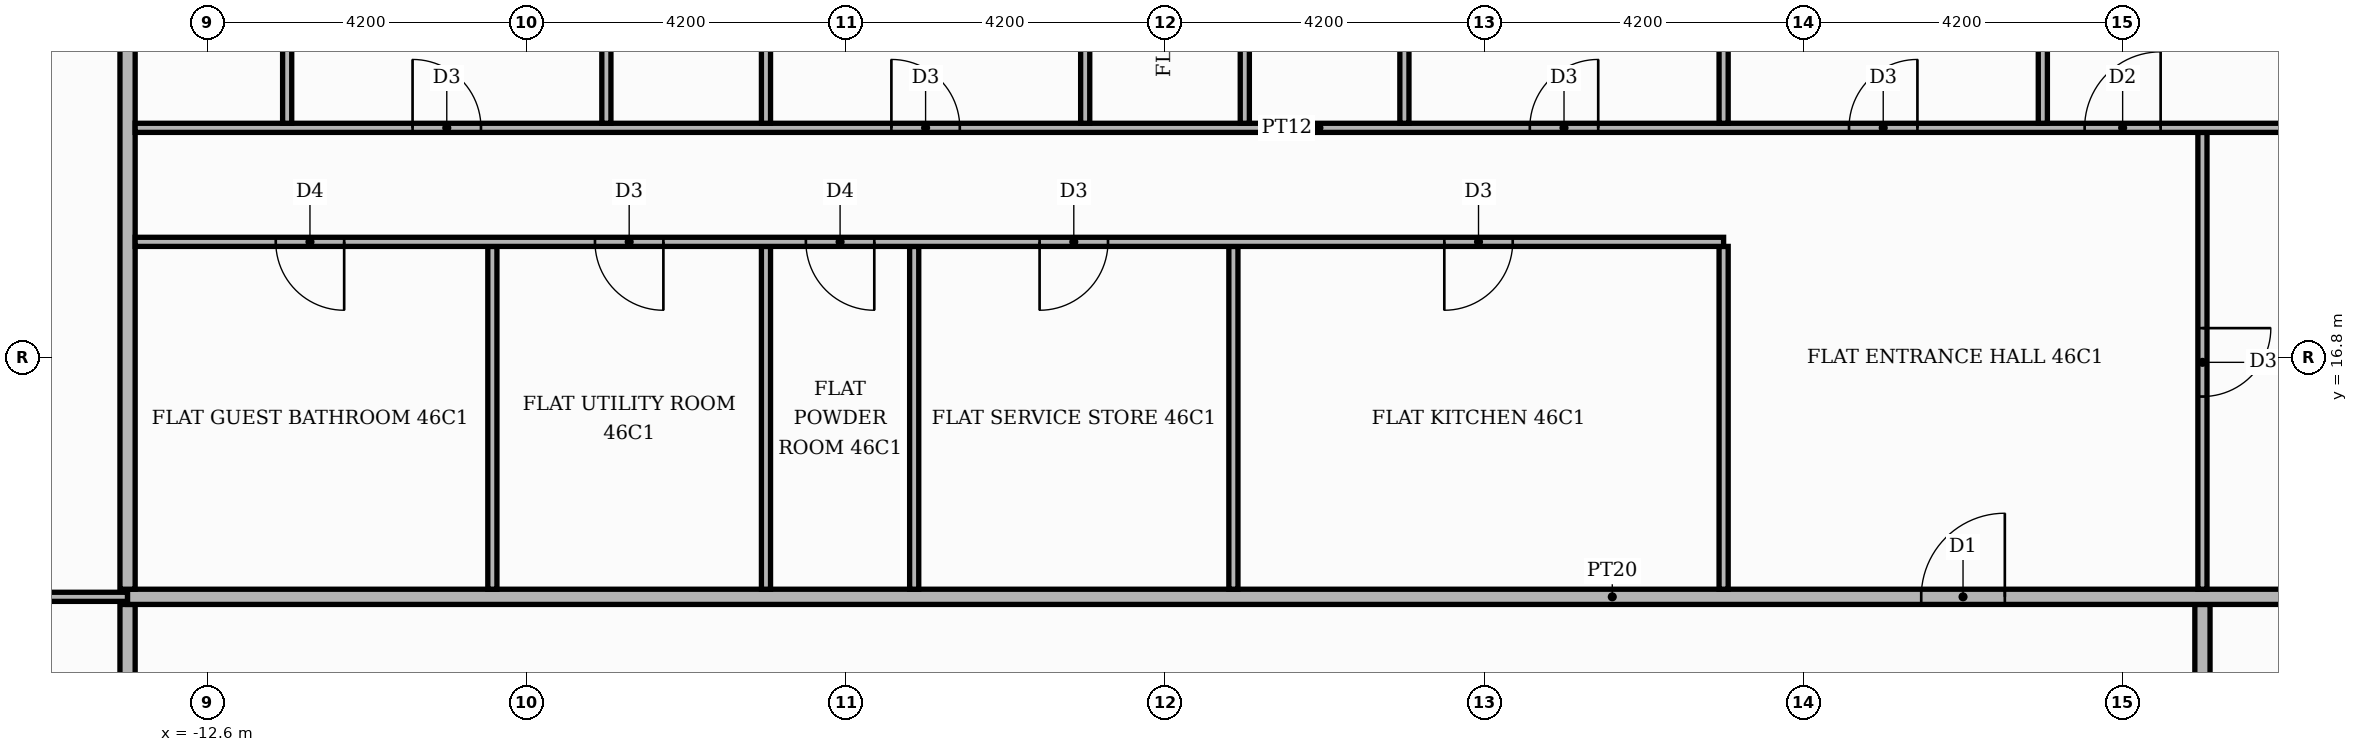
"""IFC4 building model, lengths in metres.
Left out: names, types, materials, properties, quantities, classifications, styles, units other than length and angle.
Written with IfcOpenShell. Run it as: python <this file> out.ifc"""

import sys

from ifc_helpers import new_model, si_unit, direction, frame, frame_2d, origin, place, context, subcontext, project, spatial, rectangle, extrude, element, fill, save


model = new_model("IFC4")
c1 = context("Model", 3, precision=1e-05, world=origin(), true_north=direction((0.0, 1.0)))
c2 = subcontext(c1, "Body", "Model", "MODEL_VIEW")
j1 = project(units=[si_unit("LENGTHUNIT", "METRE"), si_unit("PLANEANGLEUNIT", "RADIAN")], contexts=[c1])
p1 = place(None, origin())
s1 = spatial("IfcSite", under=j1, at=p1, CompositionType="ELEMENT")
p2 = place(p1, origin())
s2 = spatial("IfcBuilding", under=s1, at=p2, CompositionType="ELEMENT")
p3 = place(p2, frame((0.0, 0.0, 196.2)))
s3 = spatial("IfcBuildingStorey", under=s2, at=p3, CompositionType="ELEMENT", Elevation=196.2)
p4 = place(p3, frame((-13.65, -13.55, 0.0), z_axis=(0.0, 0.0, 1.0), x_axis=(0.0, 1.0, 0.0)))
e1 = element("IfcWall", 1, at=p4, inside=s3, PredefinedType="PARTITIONING", context=c2, shape_type="SweptSolid", body=[
    extrude(rectangle(XDim=27.1, YDim=0.2, at=frame_2d((13.55, 0.0))), origin(), (0.0, 0.0, 1.0), 3.48),
])
p5 = place(p4, frame((23.5, 0.0, 0.0)))
e2 = element("IfcOpeningElement", 2, at=p5, cuts=e1, PredefinedType="OPENING", context=c2, shape_type="SweptSolid", body=[
    extrude(rectangle(XDim=1.1, YDim=2.4, at=frame_2d((0.55, 1.2))), frame((0.0, 0.11, 0.0), z_axis=(0.0, -1.0, 0.0), x_axis=(1.0, 0.0, 0.0)), (0.0, 0.0, 1.0), 0.22),
])
p6 = place(p3, frame((13.65, 11.1, 0.0), z_axis=(0.0, 0.0, 1.0), x_axis=(0.0, 1.0, 0.0)))
e3 = element("IfcWall", 3, at=p6, inside=s3, PredefinedType="PARTITIONING", context=c2, shape_type="SweptSolid", body=[
    extrude(rectangle(XDim=2.45, YDim=0.2, at=frame_2d((1.225, 0.0))), origin(), (0.0, 0.0, 1.0), 3.48),
])
p7 = place(p3, frame((-20.12, 13.65, 0.0), z_axis=(0.0, 0.0, 1.0), x_axis=(1.0, 0.0, 0.0)))
e4 = element("IfcWall", 4, at=p7, inside=s3, PredefinedType="PARTITIONING", context=c2, shape_type="SweptSolid", body=[
    extrude(rectangle(XDim=6.47, YDim=0.12, at=frame_2d((3.235, 0.0))), origin(), (0.0, 0.0, 1.0), 3.48),
])
p8 = place(p7, frame((2.785, 0.0, 0.0)))
e5 = element("IfcOpeningElement", 5, at=p8, cuts=e4, PredefinedType="OPENING", context=c2, shape_type="SweptSolid", body=[
    extrude(rectangle(XDim=0.9, YDim=2.1, at=frame_2d((0.45, 1.05))), frame((0.0, 0.07, 0.0), z_axis=(0.0, -1.0, 0.0), x_axis=(1.0, 0.0, 0.0)), (0.0, 0.0, 1.0), 0.14),
])
p9 = place(p3, frame((-13.65, 13.65, 0.0), z_axis=(0.0, 0.0, 1.0), x_axis=(1.0, 0.0, 0.0)))
e6 = element("IfcWall", 6, at=p9, inside=s3, PredefinedType="PARTITIONING", context=c2, shape_type="SweptSolid", body=[
    extrude(rectangle(XDim=39.07, YDim=0.2, at=frame_2d((19.535, 0.0))), origin(), (0.0, 0.0, 1.0), 3.48),
])
p10 = place(p9, frame((23.6, 0.0, 0.0)))
e7 = element("IfcOpeningElement", 7, at=p10, cuts=e6, PredefinedType="OPENING", context=c2, shape_type="SweptSolid", body=[
    extrude(rectangle(XDim=1.1, YDim=2.4, at=frame_2d((0.55, 1.2))), frame((0.0, 0.11, 0.0), z_axis=(0.0, -1.0, 0.0), x_axis=(1.0, 0.0, 0.0)), (0.0, 0.0, 1.0), 0.22),
])
p11 = place(p3, frame((-13.65, 13.75, 0.0), z_axis=(0.0, 0.0, 1.0), x_axis=(0.0, 1.0, 0.0)))
e8 = element("IfcWall", 8, at=p11, inside=s3, PredefinedType="PARTITIONING", context=c2, shape_type="SweptSolid", body=[
    extrude(rectangle(XDim=11.67, YDim=0.2, at=frame_2d((5.835, 0.0))), origin(), (0.0, 0.0, 1.0), 3.48),
])
for number, where, z_axis, x_axis in (
    (9, (-8.85, 13.75, 0.0), (0.0, 0.0, 1.0), (0.0, 1.0, 0.0)),
    (10, (-5.25, 13.75, 0.0), (0.0, 0.0, 1.0), (0.0, 1.0, 0.0)),
    (11, (-3.3, 13.75, 0.0), (0.0, 0.0, 1.0), (0.0, 1.0, 0.0)),
    (12, (0.9, 13.75, 0.0), (0.0, 0.0, 1.0), (0.0, 1.0, 0.0)),
    (13, (7.35, 13.75, 0.0), (0.0, 0.0, 1.0), (0.0, 1.0, 0.0)),
):
    element("IfcWall", number, at=place(p3, frame(where, z_axis=z_axis, x_axis=x_axis)), inside=s3, PredefinedType="PARTITIONING", context=c2, shape_type="SweptSolid", body=[
        extrude(rectangle(XDim=4.51, YDim=0.12, at=frame_2d((2.255, 0.0))), origin(), (0.0, 0.0, 1.0), 3.48),
    ])
p12 = place(p3, frame((13.65, 13.75, 0.0), z_axis=(0.0, 0.0, 1.0), x_axis=(0.0, 1.0, 0.0)))
e14 = element("IfcWall", 14, at=p12, inside=s3, PredefinedType="PARTITIONING", context=c2, shape_type="SweptSolid", body=[
    extrude(rectangle(XDim=6.01, YDim=0.12, at=frame_2d((3.005, 0.0))), origin(), (0.0, 0.0, 1.0), 3.48),
])
p13 = place(p12, frame((2.535, 0.0, 0.0)))
e15 = element("IfcOpeningElement", 15, at=p13, cuts=e14, PredefinedType="OPENING", context=c2, shape_type="SweptSolid", body=[
    extrude(rectangle(XDim=0.9, YDim=2.1, at=frame_2d((0.45, 1.05))), frame((0.0, 0.07, 0.0), z_axis=(0.0, -1.0, 0.0), x_axis=(1.0, 0.0, 0.0)), (0.0, 0.0, 1.0), 0.14),
])
p14 = place(p3, frame((-13.55, 18.32, 0.0), z_axis=(0.0, 0.0, 1.0), x_axis=(1.0, 0.0, 0.0)))
e16 = element("IfcWall", 16, at=p14, inside=s3, PredefinedType="PARTITIONING", context=c2, shape_type="SweptSolid", body=[
    extrude(rectangle(XDim=20.9, YDim=0.12, at=frame_2d((10.45, 0.0))), origin(), (0.0, 0.0, 1.0), 3.48),
])
p15 = place(p14, frame((17.225, 0.0, 0.0)))
e17 = element("IfcOpeningElement", 17, at=p15, cuts=e16, PredefinedType="OPENING", context=c2, shape_type="SweptSolid", body=[
    extrude(rectangle(XDim=0.9, YDim=2.1, at=frame_2d((0.45, 1.05))), frame((0.0, 0.07, 0.0), z_axis=(0.0, -1.0, 0.0), x_axis=(1.0, 0.0, 0.0)), (0.0, 0.0, 1.0), 0.14),
])
p16 = place(p14, frame((11.9, 0.0, 0.0)))
e18 = element("IfcOpeningElement", 18, at=p16, cuts=e16, PredefinedType="OPENING", context=c2, shape_type="SweptSolid", body=[
    extrude(rectangle(XDim=0.9, YDim=2.1, at=frame_2d((0.45, 1.05))), frame((0.0, 0.07, 0.0), z_axis=(0.0, -1.0, 0.0), x_axis=(1.0, 0.0, 0.0)), (0.0, 0.0, 1.0), 0.14),
])
p17 = place(p14, frame((8.825, 0.0, 0.0)))
e19 = element("IfcOpeningElement", 19, at=p17, cuts=e16, PredefinedType="OPENING", context=c2, shape_type="SweptSolid", body=[
    extrude(rectangle(XDim=0.9, YDim=2.1, at=frame_2d((0.45, 1.05))), frame((0.0, 0.07, 0.0), z_axis=(0.0, -1.0, 0.0), x_axis=(1.0, 0.0, 0.0)), (0.0, 0.0, 1.0), 0.14),
])
p18 = place(p14, frame((6.05, 0.0, 0.0)))
e20 = element("IfcOpeningElement", 20, at=p18, cuts=e16, PredefinedType="OPENING", context=c2, shape_type="SweptSolid", body=[
    extrude(rectangle(XDim=0.9, YDim=2.1, at=frame_2d((0.45, 1.05))), frame((0.0, 0.07, 0.0), z_axis=(0.0, -1.0, 0.0), x_axis=(1.0, 0.0, 0.0)), (0.0, 0.0, 1.0), 0.14),
])
p19 = place(p14, frame((1.85, 0.0, 0.0)))
e21 = element("IfcOpeningElement", 21, at=p19, cuts=e16, PredefinedType="OPENING", context=c2, shape_type="SweptSolid", body=[
    extrude(rectangle(XDim=0.9, YDim=2.1, at=frame_2d((0.45, 1.05))), frame((0.0, 0.07, 0.0), z_axis=(0.0, -1.0, 0.0), x_axis=(1.0, 0.0, 0.0)), (0.0, 0.0, 1.0), 0.14),
])
p20 = place(p3, frame((-13.55, 19.82, 0.0), z_axis=(0.0, 0.0, 1.0), x_axis=(1.0, 0.0, 0.0)))
e22 = element("IfcWall", 22, at=p20, inside=s3, PredefinedType="PARTITIONING", context=c2, shape_type="SweptSolid", body=[
    extrude(rectangle(XDim=31.15, YDim=0.12, at=frame_2d((15.575, 0.0))), origin(), (0.0, 0.0, 1.0), 3.48),
])
p21 = place(p20, frame((25.65, 0.0, 0.0)))
e23 = element("IfcOpeningElement", 23, at=p21, cuts=e22, PredefinedType="OPENING", context=c2, shape_type="SweptSolid", body=[
    extrude(rectangle(XDim=1.0, YDim=2.1, at=frame_2d((0.5, 1.05))), frame((0.0, 0.07, 0.0), z_axis=(0.0, -1.0, 0.0), x_axis=(1.0, 0.0, 0.0)), (0.0, 0.0, 1.0), 0.14),
])
p22 = place(p20, frame((22.55, 0.0, 0.0)))
e24 = element("IfcOpeningElement", 24, at=p22, cuts=e22, PredefinedType="OPENING", context=c2, shape_type="SweptSolid", body=[
    extrude(rectangle(XDim=0.9, YDim=2.1, at=frame_2d((0.45, 1.05))), frame((0.0, 0.07, 0.0), z_axis=(0.0, -1.0, 0.0), x_axis=(1.0, 0.0, 0.0)), (0.0, 0.0, 1.0), 0.14),
])
p23 = place(p20, frame((18.35, 0.0, 0.0)))
e25 = element("IfcOpeningElement", 25, at=p23, cuts=e22, PredefinedType="OPENING", context=c2, shape_type="SweptSolid", body=[
    extrude(rectangle(XDim=0.9, YDim=2.1, at=frame_2d((0.45, 1.05))), frame((0.0, 0.07, 0.0), z_axis=(0.0, -1.0, 0.0), x_axis=(1.0, 0.0, 0.0)), (0.0, 0.0, 1.0), 0.14),
])
p24 = place(p20, frame((9.95, 0.0, 0.0)))
e26 = element("IfcOpeningElement", 26, at=p24, cuts=e22, PredefinedType="OPENING", context=c2, shape_type="SweptSolid", body=[
    extrude(rectangle(XDim=0.9, YDim=2.1, at=frame_2d((0.45, 1.05))), frame((0.0, 0.07, 0.0), z_axis=(0.0, -1.0, 0.0), x_axis=(1.0, 0.0, 0.0)), (0.0, 0.0, 1.0), 0.14),
])
p25 = place(p20, frame((3.65, 0.0, 0.0)))
e27 = element("IfcOpeningElement", 27, at=p25, cuts=e22, PredefinedType="OPENING", context=c2, shape_type="SweptSolid", body=[
    extrude(rectangle(XDim=0.9, YDim=2.1, at=frame_2d((0.45, 1.05))), frame((0.0, 0.07, 0.0), z_axis=(0.0, -1.0, 0.0), x_axis=(1.0, 0.0, 0.0)), (0.0, 0.0, 1.0), 0.14),
])
p26 = place(p3, frame((-11.55, 19.88, 0.0), z_axis=(0.0, 0.0, 1.0), x_axis=(0.0, 1.0, 0.0)))
e28 = element("IfcWall", 28, at=p26, inside=s3, PredefinedType="PARTITIONING", context=c2, shape_type="SweptSolid", body=[
    extrude(rectangle(XDim=5.54, YDim=0.12, at=frame_2d((2.77, 0.0))), origin(), (0.0, 0.0, 1.0), 3.48),
])
p27 = place(p26, frame((2.44, 0.0, 0.0)))
e29 = element("IfcOpeningElement", 29, at=p27, cuts=e28, PredefinedType="OPENING", context=c2, shape_type="SweptSolid", body=[
    extrude(rectangle(XDim=0.9, YDim=2.1, at=frame_2d((0.45, 1.05))), frame((0.0, 0.07, 0.0), z_axis=(0.0, -1.0, 0.0), x_axis=(1.0, 0.0, 0.0)), (0.0, 0.0, 1.0), 0.14),
])
p28 = place(p3, frame((-7.35, 19.88, 0.0), z_axis=(0.0, 0.0, 1.0), x_axis=(0.0, 1.0, 0.0)))
e30 = element("IfcWall", 30, at=p28, inside=s3, PredefinedType="PARTITIONING", context=c2, shape_type="SweptSolid", body=[
    extrude(rectangle(XDim=5.54, YDim=0.12, at=frame_2d((2.77, 0.0))), origin(), (0.0, 0.0, 1.0), 3.48),
])
p29 = place(p3, frame((-5.25, 19.88, 0.0), z_axis=(0.0, 0.0, 1.0), x_axis=(0.0, 1.0, 0.0)))
e31 = element("IfcWall", 31, at=p29, inside=s3, PredefinedType="PARTITIONING", context=c2, shape_type="SweptSolid", body=[
    extrude(rectangle(XDim=5.54, YDim=0.12, at=frame_2d((2.77, 0.0))), origin(), (0.0, 0.0, 1.0), 3.48),
])
p30 = place(p29, frame((2.44, 0.0, 0.0)))
e32 = element("IfcOpeningElement", 32, at=p30, cuts=e31, PredefinedType="OPENING", context=c2, shape_type="SweptSolid", body=[
    extrude(rectangle(XDim=0.9, YDim=2.1, at=frame_2d((0.45, 1.05))), frame((0.0, 0.07, 0.0), z_axis=(0.0, -1.0, 0.0), x_axis=(1.0, 0.0, 0.0)), (0.0, 0.0, 1.0), 0.14),
])
p31 = place(p3, frame((-1.05, 19.88, 0.0), z_axis=(0.0, 0.0, 1.0), x_axis=(0.0, 1.0, 0.0)))
e33 = element("IfcWall", 33, at=p31, inside=s3, PredefinedType="PARTITIONING", context=c2, shape_type="SweptSolid", body=[
    extrude(rectangle(XDim=5.54, YDim=0.12, at=frame_2d((2.77, 0.0))), origin(), (0.0, 0.0, 1.0), 3.48),
])
p32 = place(p3, frame((1.05, 19.88, 0.0), z_axis=(0.0, 0.0, 1.0), x_axis=(0.0, 1.0, 0.0)))
e34 = element("IfcWall", 34, at=p32, inside=s3, PredefinedType="PARTITIONING", context=c2, shape_type="SweptSolid", body=[
    extrude(rectangle(XDim=5.54, YDim=0.12, at=frame_2d((2.77, 0.0))), origin(), (0.0, 0.0, 1.0), 3.48),
])
p33 = place(p32, frame((2.44, 0.0, 0.0)))
e35 = element("IfcOpeningElement", 35, at=p33, cuts=e34, PredefinedType="OPENING", context=c2, shape_type="SweptSolid", body=[
    extrude(rectangle(XDim=0.9, YDim=2.1, at=frame_2d((0.45, 1.05))), frame((0.0, 0.07, 0.0), z_axis=(0.0, -1.0, 0.0), x_axis=(1.0, 0.0, 0.0)), (0.0, 0.0, 1.0), 0.14),
])
p34 = place(p3, frame((3.15, 19.88, 0.0), z_axis=(0.0, 0.0, 1.0), x_axis=(0.0, 1.0, 0.0)))
e36 = element("IfcWall", 36, at=p34, inside=s3, PredefinedType="PARTITIONING", context=c2, shape_type="SweptSolid", body=[
    extrude(rectangle(XDim=5.54, YDim=0.12, at=frame_2d((2.77, 0.0))), origin(), (0.0, 0.0, 1.0), 3.48),
])
p35 = place(p34, frame((2.44, 0.0, 0.0)))
e37 = element("IfcOpeningElement", 37, at=p35, cuts=e36, PredefinedType="OPENING", context=c2, shape_type="SweptSolid", body=[
    extrude(rectangle(XDim=0.9, YDim=2.1, at=frame_2d((0.45, 1.05))), frame((0.0, 0.07, 0.0), z_axis=(0.0, -1.0, 0.0), x_axis=(1.0, 0.0, 0.0)), (0.0, 0.0, 1.0), 0.14),
])
for number, where, z_axis, x_axis in (
    (38, (7.35, 19.88, 0.0), (0.0, 0.0, 1.0), (0.0, 1.0, 0.0)),
    (39, (11.55, 19.88, 0.0), (0.0, 0.0, 1.0), (0.0, 1.0, 0.0)),
):
    element("IfcWall", number, at=place(p3, frame(where, z_axis=z_axis, x_axis=x_axis)), inside=s3, PredefinedType="PARTITIONING", context=c2, shape_type="SweptSolid", body=[
        extrude(rectangle(XDim=5.54, YDim=0.12, at=frame_2d((2.77, 0.0))), origin(), (0.0, 0.0, 1.0), 3.48),
    ])
p36 = place(p10, origin())
e40 = element("IfcDoor", 40, at=p36, inside=s3, OperationType="SINGLE_SWING_RIGHT", PredefinedType="DOOR", context=c2, shape_type="SweptSolid", body=[
    extrude(rectangle(XDim=1.1, YDim=2.4, at=frame_2d((0.55, 1.2))), frame((0.0, 0.025, 0.0), z_axis=(0.0, -1.0, 0.0), x_axis=(1.0, 0.0, 0.0)), (0.0, 0.0, 1.0), 0.05),
])
fill(e7, e40)
p37 = place(p13, frame((0.9, 0.0, 0.0), z_axis=(0.0, 0.0, 1.0), x_axis=(-1.0, 0.0, 0.0)))
e41 = element("IfcDoor", 41, at=p37, inside=s3, OperationType="SINGLE_SWING_RIGHT", PredefinedType="DOOR", context=c2, shape_type="SweptSolid", body=[
    extrude(rectangle(XDim=0.9, YDim=2.1, at=frame_2d((0.45, 1.05))), frame((0.0, 0.025, 0.0), z_axis=(0.0, -1.0, 0.0), x_axis=(1.0, 0.0, 0.0)), (0.0, 0.0, 1.0), 0.05),
])
fill(e15, e41)
p38 = place(p15, frame((0.9, 0.0, 0.0), z_axis=(0.0, 0.0, 1.0), x_axis=(-1.0, 0.0, 0.0)))
e42 = element("IfcDoor", 42, at=p38, inside=s3, OperationType="SINGLE_SWING_LEFT", PredefinedType="DOOR", context=c2, shape_type="SweptSolid", body=[
    extrude(rectangle(XDim=0.9, YDim=2.1, at=frame_2d((0.45, 1.05))), frame((0.0, 0.025, 0.0), z_axis=(0.0, -1.0, 0.0), x_axis=(1.0, 0.0, 0.0)), (0.0, 0.0, 1.0), 0.05),
])
fill(e17, e42)
p39 = place(p16, frame((0.9, 0.0, 0.0), z_axis=(0.0, 0.0, 1.0), x_axis=(-1.0, 0.0, 0.0)))
e43 = element("IfcDoor", 43, at=p39, inside=s3, OperationType="SINGLE_SWING_LEFT", PredefinedType="DOOR", context=c2, shape_type="SweptSolid", body=[
    extrude(rectangle(XDim=0.9, YDim=2.1, at=frame_2d((0.45, 1.05))), frame((0.0, 0.025, 0.0), z_axis=(0.0, -1.0, 0.0), x_axis=(1.0, 0.0, 0.0)), (0.0, 0.0, 1.0), 0.05),
])
fill(e18, e43)
p40 = place(p17, frame((0.9, 0.0, 0.0), z_axis=(0.0, 0.0, 1.0), x_axis=(-1.0, 0.0, 0.0)))
e44 = element("IfcDoor", 44, at=p40, inside=s3, OperationType="SINGLE_SWING_RIGHT", PredefinedType="DOOR", context=c2, shape_type="SweptSolid", body=[
    extrude(rectangle(XDim=0.9, YDim=2.1, at=frame_2d((0.45, 1.05))), frame((0.0, 0.025, 0.0), z_axis=(0.0, -1.0, 0.0), x_axis=(1.0, 0.0, 0.0)), (0.0, 0.0, 1.0), 0.05),
])
fill(e19, e44)
p41 = place(p18, frame((0.9, 0.0, 0.0), z_axis=(0.0, 0.0, 1.0), x_axis=(-1.0, 0.0, 0.0)))
e45 = element("IfcDoor", 45, at=p41, inside=s3, OperationType="SINGLE_SWING_RIGHT", PredefinedType="DOOR", context=c2, shape_type="SweptSolid", body=[
    extrude(rectangle(XDim=0.9, YDim=2.1, at=frame_2d((0.45, 1.05))), frame((0.0, 0.025, 0.0), z_axis=(0.0, -1.0, 0.0), x_axis=(1.0, 0.0, 0.0)), (0.0, 0.0, 1.0), 0.05),
])
fill(e20, e45)
p42 = place(p19, frame((0.9, 0.0, 0.0), z_axis=(0.0, 0.0, 1.0), x_axis=(-1.0, 0.0, 0.0)))
e46 = element("IfcDoor", 46, at=p42, inside=s3, OperationType="SINGLE_SWING_RIGHT", PredefinedType="DOOR", context=c2, shape_type="SweptSolid", body=[
    extrude(rectangle(XDim=0.9, YDim=2.1, at=frame_2d((0.45, 1.05))), frame((0.0, 0.025, 0.0), z_axis=(0.0, -1.0, 0.0), x_axis=(1.0, 0.0, 0.0)), (0.0, 0.0, 1.0), 0.05),
])
fill(e21, e46)
p43 = place(p21, origin())
e47 = element("IfcDoor", 47, at=p43, inside=s3, OperationType="SINGLE_SWING_RIGHT", PredefinedType="DOOR", context=c2, shape_type="SweptSolid", body=[
    extrude(rectangle(XDim=1.0, YDim=2.1, at=frame_2d((0.5, 1.05))), frame((0.0, 0.025, 0.0), z_axis=(0.0, -1.0, 0.0), x_axis=(1.0, 0.0, 0.0)), (0.0, 0.0, 1.0), 0.05),
])
fill(e23, e47)
p44 = place(p22, origin())
e48 = element("IfcDoor", 48, at=p44, inside=s3, OperationType="SINGLE_SWING_RIGHT", PredefinedType="DOOR", context=c2, shape_type="SweptSolid", body=[
    extrude(rectangle(XDim=0.9, YDim=2.1, at=frame_2d((0.45, 1.05))), frame((0.0, 0.025, 0.0), z_axis=(0.0, -1.0, 0.0), x_axis=(1.0, 0.0, 0.0)), (0.0, 0.0, 1.0), 0.05),
])
fill(e24, e48)
p45 = place(p23, origin())
e49 = element("IfcDoor", 49, at=p45, inside=s3, OperationType="SINGLE_SWING_RIGHT", PredefinedType="DOOR", context=c2, shape_type="SweptSolid", body=[
    extrude(rectangle(XDim=0.9, YDim=2.1, at=frame_2d((0.45, 1.05))), frame((0.0, 0.025, 0.0), z_axis=(0.0, -1.0, 0.0), x_axis=(1.0, 0.0, 0.0)), (0.0, 0.0, 1.0), 0.05),
])
fill(e25, e49)
p46 = place(p24, origin())
e50 = element("IfcDoor", 50, at=p46, inside=s3, OperationType="SINGLE_SWING_LEFT", PredefinedType="DOOR", context=c2, shape_type="SweptSolid", body=[
    extrude(rectangle(XDim=0.9, YDim=2.1, at=frame_2d((0.45, 1.05))), frame((0.0, 0.025, 0.0), z_axis=(0.0, -1.0, 0.0), x_axis=(1.0, 0.0, 0.0)), (0.0, 0.0, 1.0), 0.05),
])
fill(e26, e50)
p47 = place(p25, origin())
e51 = element("IfcDoor", 51, at=p47, inside=s3, OperationType="SINGLE_SWING_LEFT", PredefinedType="DOOR", context=c2, shape_type="SweptSolid", body=[
    extrude(rectangle(XDim=0.9, YDim=2.1, at=frame_2d((0.45, 1.05))), frame((0.0, 0.025, 0.0), z_axis=(0.0, -1.0, 0.0), x_axis=(1.0, 0.0, 0.0)), (0.0, 0.0, 1.0), 0.05),
])
fill(e27, e51)
save(model, sys.argv[1])
